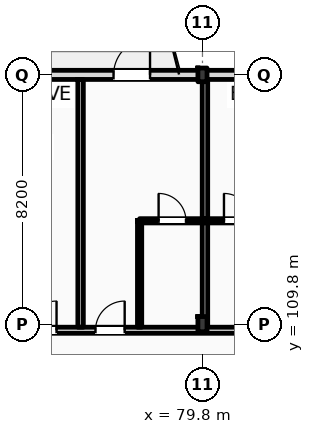
"""IFC4 building model, lengths in metres.
Left out: names, types, materials, properties, quantities, classifications, styles, units other than length and angle.
Written with IfcOpenShell. Run it as: python <this file> out.ifc"""

import sys

from ifc_helpers import new_model, si_unit, direction, frame, frame_2d, origin, origin_2d, place, context, subcontext, project, spatial, rectangle, i_section, extrude, element, fill, save


model = new_model("IFC4")
c1 = context("Model", 3, precision=1e-05, world=origin(), true_north=direction((0.0, 1.0)))
c2 = subcontext(c1, "Body", "Model", "MODEL_VIEW")
j1 = project(units=[si_unit("LENGTHUNIT", "METRE"), si_unit("PLANEANGLEUNIT", "RADIAN")], contexts=[c1])
p1 = place(None, origin())
s1 = spatial("IfcSite", under=j1, at=p1, CompositionType="ELEMENT")
p2 = place(p1, origin())
s2 = spatial("IfcBuilding", under=s1, at=p2, CompositionType="ELEMENT")
p3 = place(p2, frame((0.0, 0.0, 28.2)))
s3 = spatial("IfcBuildingStorey", under=s2, at=p3, CompositionType="ELEMENT", Elevation=28.2)
p4 = place(p3, frame((79.8, 109.8, 0.0), z_axis=(0.0, 0.0, 1.0), x_axis=(1.0, 0.0, 0.0)))
e1 = element("IfcColumn", 1, at=p4, inside=s3, PredefinedType="COLUMN", context=c2, shape_type="SweptSolid", body=[
    extrude(i_section(OverallWidth=0.3, OverallDepth=0.5, WebThickness=0.014, FlangeThickness=0.028, FilletRadius=0.027, at=origin_2d()), origin(), (0.0, 0.0, 1.0), 3.6),
])
p5 = place(p3, frame((79.8, 118.0, 0.0), z_axis=(0.0, 0.0, 1.0), x_axis=(1.0, 0.0, 0.0)))
e2 = element("IfcColumn", 2, at=p5, inside=s3, PredefinedType="COLUMN", context=c2, shape_type="SweptSolid", body=[
    extrude(i_section(OverallWidth=0.3, OverallDepth=0.45, WebThickness=0.014, FlangeThickness=0.026, FilletRadius=0.027, at=origin_2d()), origin(), (0.0, 0.0, 1.0), 3.6),
])
p6 = place(p3, frame((22.5, 118.0, 0.0), z_axis=(0.0, 0.0, 1.0), x_axis=(1.0, 0.0, 0.0)))
e3 = element("IfcWall", 3, at=p6, inside=s3, PredefinedType="STANDARD", context=c2, shape_type="SweptSolid", body=[
    extrude(rectangle(XDim=97.5, YDim=0.3, at=frame_2d((48.75, 0.0))), origin(), (0.0, 0.0, 1.0), 2.8),
])
p7 = place(p6, frame((0.91, 0.0, 0.9)))
e4 = element("IfcOpeningElement", 4, at=p7, cuts=e3, PredefinedType="OPENING", context=c2, shape_type="SweptSolid", body=[
    extrude(rectangle(XDim=0.9, YDim=1.72, at=frame_2d((0.45, 0.86))), frame((0.0, 0.16, 0.0), z_axis=(0.0, -1.0, 0.0), x_axis=(1.0, 0.0, 0.0)), (0.0, 0.0, 1.0), 0.32),
])
p8 = place(p6, frame((6.561, 0.0, 0.0)))
e5 = element("IfcOpeningElement", 5, at=p8, cuts=e3, PredefinedType="OPENING", context=c2, shape_type="SweptSolid", body=[
    extrude(rectangle(XDim=1.2, YDim=2.25, at=frame_2d((0.6, 1.125))), frame((0.0, 0.16, 0.0), z_axis=(0.0, -1.0, 0.0), x_axis=(1.0, 0.0, 0.0)), (0.0, 0.0, 1.0), 0.32),
])
p9 = place(p6, frame((11.477, 0.0, 0.9)))
e6 = element("IfcOpeningElement", 6, at=p9, cuts=e3, PredefinedType="OPENING", context=c2, shape_type="SweptSolid", body=[
    extrude(rectangle(XDim=1.1, YDim=1.5, at=frame_2d((0.55, 0.75))), frame((0.0, 0.16, 0.0), z_axis=(0.0, -1.0, 0.0), x_axis=(1.0, 0.0, 0.0)), (0.0, 0.0, 1.0), 0.32),
])
p10 = place(p6, frame((15.194, 0.0, 0.9)))
e7 = element("IfcOpeningElement", 7, at=p10, cuts=e3, PredefinedType="OPENING", context=c2, shape_type="SweptSolid", body=[
    extrude(rectangle(XDim=1.25, YDim=1.6, at=frame_2d((0.625, 0.8))), frame((0.0, 0.16, 0.0), z_axis=(0.0, -1.0, 0.0), x_axis=(1.0, 0.0, 0.0)), (0.0, 0.0, 1.0), 0.32),
])
p11 = place(p6, frame((19.509, 0.0, 0.9)))
e8 = element("IfcOpeningElement", 8, at=p11, cuts=e3, PredefinedType="OPENING", context=c2, shape_type="SweptSolid", body=[
    extrude(rectangle(XDim=1.4, YDim=1.7, at=frame_2d((0.7, 0.85))), frame((0.0, 0.16, 0.0), z_axis=(0.0, -1.0, 0.0), x_axis=(1.0, 0.0, 0.0)), (0.0, 0.0, 1.0), 0.32),
])
p12 = place(p6, frame((23.258, 0.0, 0.0)))
e9 = element("IfcOpeningElement", 9, at=p12, cuts=e3, PredefinedType="OPENING", context=c2, shape_type="SweptSolid", body=[
    extrude(rectangle(XDim=1.2, YDim=2.25, at=frame_2d((0.6, 1.125))), frame((0.0, 0.16, 0.0), z_axis=(0.0, -1.0, 0.0), x_axis=(1.0, 0.0, 0.0)), (0.0, 0.0, 1.0), 0.32),
])
p13 = place(p6, frame((28.115, 0.0, 0.9)))
e10 = element("IfcOpeningElement", 10, at=p13, cuts=e3, PredefinedType="OPENING", context=c2, shape_type="SweptSolid", body=[
    extrude(rectangle(XDim=1.75, YDim=1.72, at=frame_2d((0.875, 0.86))), frame((0.0, 0.16, 0.0), z_axis=(0.0, -1.0, 0.0), x_axis=(1.0, 0.0, 0.0)), (0.0, 0.0, 1.0), 0.32),
])
p14 = place(p6, frame((31.582, 0.0, 0.9)))
e11 = element("IfcOpeningElement", 11, at=p14, cuts=e3, PredefinedType="OPENING", context=c2, shape_type="SweptSolid", body=[
    extrude(rectangle(XDim=1.35, YDim=1.72, at=frame_2d((0.675, 0.86))), frame((0.0, 0.16, 0.0), z_axis=(0.0, -1.0, 0.0), x_axis=(1.0, 0.0, 0.0)), (0.0, 0.0, 1.0), 0.32),
])
p15 = place(p6, frame((37.379, 0.0, 0.0)))
e12 = element("IfcOpeningElement", 12, at=p15, cuts=e3, PredefinedType="OPENING", context=c2, shape_type="SweptSolid", body=[
    extrude(rectangle(XDim=1.2, YDim=2.25, at=frame_2d((0.6, 1.125))), frame((0.0, 0.16, 0.0), z_axis=(0.0, -1.0, 0.0), x_axis=(1.0, 0.0, 0.0)), (0.0, 0.0, 1.0), 0.32),
])
p16 = place(p6, frame((42.663, 0.0, 0.9)))
e13 = element("IfcOpeningElement", 13, at=p16, cuts=e3, PredefinedType="OPENING", context=c2, shape_type="SweptSolid", body=[
    extrude(rectangle(XDim=1.35, YDim=1.72, at=frame_2d((0.675, 0.86))), frame((0.0, 0.16, 0.0), z_axis=(0.0, -1.0, 0.0), x_axis=(1.0, 0.0, 0.0)), (0.0, 0.0, 1.0), 0.32),
])
p17 = place(p6, frame((45.119, 0.0, 0.9)))
e14 = element("IfcOpeningElement", 14, at=p17, cuts=e3, PredefinedType="OPENING", context=c2, shape_type="SweptSolid", body=[
    extrude(rectangle(XDim=2.871, YDim=1.72, at=frame_2d((1.436, 0.86))), frame((0.0, 0.16, 0.0), z_axis=(0.0, -1.0, 0.0), x_axis=(1.0, 0.0, 0.0)), (0.0, 0.0, 1.0), 0.32),
])
p18 = place(p6, frame((50.41, 0.0, 0.9)))
e15 = element("IfcOpeningElement", 15, at=p18, cuts=e3, PredefinedType="OPENING", context=c2, shape_type="SweptSolid", body=[
    extrude(rectangle(XDim=1.8, YDim=1.72, at=frame_2d((0.9, 0.86))), frame((0.0, 0.16, 0.0), z_axis=(0.0, -1.0, 0.0), x_axis=(1.0, 0.0, 0.0)), (0.0, 0.0, 1.0), 0.32),
])
p19 = place(p6, frame((54.375, 0.0, 0.0)))
e16 = element("IfcOpeningElement", 16, at=p19, cuts=e3, PredefinedType="OPENING", context=c2, shape_type="SweptSolid", body=[
    extrude(rectangle(XDim=1.2, YDim=2.25, at=frame_2d((0.6, 1.125))), frame((0.0, 0.16, 0.0), z_axis=(0.0, -1.0, 0.0), x_axis=(1.0, 0.0, 0.0)), (0.0, 0.0, 1.0), 0.32),
])
p20 = place(p6, frame((59.052, 0.0, 0.9)))
e17 = element("IfcOpeningElement", 17, at=p20, cuts=e3, PredefinedType="OPENING", context=c2, shape_type="SweptSolid", body=[
    extrude(rectangle(XDim=1.35, YDim=1.72, at=frame_2d((0.675, 0.86))), frame((0.0, 0.16, 0.0), z_axis=(0.0, -1.0, 0.0), x_axis=(1.0, 0.0, 0.0)), (0.0, 0.0, 1.0), 0.32),
])
p21 = place(p6, frame((62.768, 0.0, 0.9)))
e18 = element("IfcOpeningElement", 18, at=p21, cuts=e3, PredefinedType="OPENING", context=c2, shape_type="SweptSolid", body=[
    extrude(rectangle(XDim=1.5, YDim=1.72, at=frame_2d((0.75, 0.86))), frame((0.0, 0.16, 0.0), z_axis=(0.0, -1.0, 0.0), x_axis=(1.0, 0.0, 0.0)), (0.0, 0.0, 1.0), 0.32),
])
p22 = place(p6, frame((68.498, 0.0, 0.0)))
e19 = element("IfcOpeningElement", 19, at=p22, cuts=e3, PredefinedType="OPENING", context=c2, shape_type="SweptSolid", body=[
    extrude(rectangle(XDim=1.2, YDim=2.25, at=frame_2d((0.6, 1.125))), frame((0.0, 0.16, 0.0), z_axis=(0.0, -1.0, 0.0), x_axis=(1.0, 0.0, 0.0)), (0.0, 0.0, 1.0), 0.32),
])
p23 = place(p6, frame((71.265, 0.0, 0.9)))
e20 = element("IfcOpeningElement", 20, at=p23, cuts=e3, PredefinedType="OPENING", context=c2, shape_type="SweptSolid", body=[
    extrude(rectangle(XDim=0.9, YDim=1.72, at=frame_2d((0.45, 0.86))), frame((0.0, 0.16, 0.0), z_axis=(0.0, -1.0, 0.0), x_axis=(1.0, 0.0, 0.0)), (0.0, 0.0, 1.0), 0.32),
])
p24 = place(p6, frame((76.316, 0.0, 0.9)))
e21 = element("IfcOpeningElement", 21, at=p24, cuts=e3, PredefinedType="OPENING", context=c2, shape_type="SweptSolid", body=[
    extrude(rectangle(XDim=1.95, YDim=1.72, at=frame_2d((0.975, 0.86))), frame((0.0, 0.16, 0.0), z_axis=(0.0, -1.0, 0.0), x_axis=(1.0, 0.0, 0.0)), (0.0, 0.0, 1.0), 0.32),
])
p25 = place(p6, frame((81.632, 0.0, 0.9)))
e22 = element("IfcOpeningElement", 22, at=p25, cuts=e3, PredefinedType="OPENING", context=c2, shape_type="SweptSolid", body=[
    extrude(rectangle(XDim=1.35, YDim=1.72, at=frame_2d((0.675, 0.86))), frame((0.0, 0.16, 0.0), z_axis=(0.0, -1.0, 0.0), x_axis=(1.0, 0.0, 0.0)), (0.0, 0.0, 1.0), 0.32),
])
p26 = place(p6, frame((84.948, 0.0, 0.9)))
e23 = element("IfcOpeningElement", 23, at=p26, cuts=e3, PredefinedType="OPENING", context=c2, shape_type="SweptSolid", body=[
    extrude(rectangle(XDim=2.25, YDim=1.72, at=frame_2d((1.125, 0.86))), frame((0.0, 0.16, 0.0), z_axis=(0.0, -1.0, 0.0), x_axis=(1.0, 0.0, 0.0)), (0.0, 0.0, 1.0), 0.32),
])
p27 = place(p6, frame((90.063, 0.0, 0.9)))
e24 = element("IfcOpeningElement", 24, at=p27, cuts=e3, PredefinedType="OPENING", context=c2, shape_type="SweptSolid", body=[
    extrude(rectangle(XDim=1.8, YDim=1.72, at=frame_2d((0.9, 0.86))), frame((0.0, 0.16, 0.0), z_axis=(0.0, -1.0, 0.0), x_axis=(1.0, 0.0, 0.0)), (0.0, 0.0, 1.0), 0.32),
])
p28 = place(p6, frame((93.529, 0.0, 0.9)))
e25 = element("IfcOpeningElement", 25, at=p28, cuts=e3, PredefinedType="OPENING", context=c2, shape_type="SweptSolid", body=[
    extrude(rectangle(XDim=2.55, YDim=1.72, at=frame_2d((1.275, 0.86))), frame((0.0, 0.16, 0.0), z_axis=(0.0, -1.0, 0.0), x_axis=(1.0, 0.0, 0.0)), (0.0, 0.0, 1.0), 0.32),
])
p29 = place(p3, frame((10.65, 109.6, 0.0), z_axis=(0.0, 0.0, 1.0), x_axis=(1.0, 0.0, 0.0)))
e26 = element("IfcWall", 26, at=p29, inside=s3, PredefinedType="PARTITIONING", context=c2, shape_type="SweptSolid", body=[
    extrude(rectangle(XDim=109.21, YDim=0.2, at=frame_2d((54.605, 0.0))), origin(), (0.0, 0.0, 1.0), 2.8),
])
p30 = place(p29, frame((12.611, 0.0, 0.0)))
e27 = element("IfcOpeningElement", 27, at=p30, cuts=e26, PredefinedType="OPENING", context=c2, shape_type="SweptSolid", body=[
    extrude(rectangle(XDim=1.02, YDim=2.2, at=frame_2d((0.51, 1.1))), frame((0.0, 0.11, 0.0), z_axis=(0.0, -1.0, 0.0), x_axis=(1.0, 0.0, 0.0)), (0.0, 0.0, 1.0), 0.22),
])
p31 = place(p29, frame((19.451, 0.0, 0.0)))
e28 = element("IfcOpeningElement", 28, at=p31, cuts=e26, PredefinedType="OPENING", context=c2, shape_type="SweptSolid", body=[
    extrude(rectangle(XDim=1.02, YDim=2.2, at=frame_2d((0.51, 1.1))), frame((0.0, 0.11, 0.0), z_axis=(0.0, -1.0, 0.0), x_axis=(1.0, 0.0, 0.0)), (0.0, 0.0, 1.0), 0.22),
])
p32 = place(p29, frame((23.842, 0.0, 0.0)))
e29 = element("IfcOpeningElement", 29, at=p32, cuts=e26, PredefinedType="OPENING", context=c2, shape_type="SweptSolid", body=[
    extrude(rectangle(XDim=1.02, YDim=2.2, at=frame_2d((0.51, 1.1))), frame((0.0, 0.11, 0.0), z_axis=(0.0, -1.0, 0.0), x_axis=(1.0, 0.0, 0.0)), (0.0, 0.0, 1.0), 0.22),
])
p33 = place(p29, frame((26.084, 0.0, 0.0)))
e30 = element("IfcOpeningElement", 30, at=p33, cuts=e26, PredefinedType="OPENING", context=c2, shape_type="SweptSolid", body=[
    extrude(rectangle(XDim=1.02, YDim=2.2, at=frame_2d((0.51, 1.1))), frame((0.0, 0.11, 0.0), z_axis=(0.0, -1.0, 0.0), x_axis=(1.0, 0.0, 0.0)), (0.0, 0.0, 1.0), 0.22),
])
p34 = place(p29, frame((32.655, 0.0, 0.0)))
e31 = element("IfcOpeningElement", 31, at=p34, cuts=e26, PredefinedType="OPENING", context=c2, shape_type="SweptSolid", body=[
    extrude(rectangle(XDim=0.96, YDim=2.2, at=frame_2d((0.48, 1.1))), frame((0.0, 0.11, 0.0), z_axis=(0.0, -1.0, 0.0), x_axis=(1.0, 0.0, 0.0)), (0.0, 0.0, 1.0), 0.22),
])
p35 = place(p29, frame((34.895, 0.0, 0.0)))
e32 = element("IfcOpeningElement", 32, at=p35, cuts=e26, PredefinedType="OPENING", context=c2, shape_type="SweptSolid", body=[
    extrude(rectangle(XDim=0.96, YDim=2.2, at=frame_2d((0.48, 1.1))), frame((0.0, 0.11, 0.0), z_axis=(0.0, -1.0, 0.0), x_axis=(1.0, 0.0, 0.0)), (0.0, 0.0, 1.0), 0.22),
])
p36 = place(p29, frame((41.436, 0.0, 0.0)))
e33 = element("IfcOpeningElement", 33, at=p36, cuts=e26, PredefinedType="OPENING", context=c2, shape_type="SweptSolid", body=[
    extrude(rectangle(XDim=0.96, YDim=2.2, at=frame_2d((0.48, 1.1))), frame((0.0, 0.11, 0.0), z_axis=(0.0, -1.0, 0.0), x_axis=(1.0, 0.0, 0.0)), (0.0, 0.0, 1.0), 0.22),
])
p37 = place(p29, frame((43.427, 0.0, 0.0)))
e34 = element("IfcOpeningElement", 34, at=p37, cuts=e26, PredefinedType="OPENING", context=c2, shape_type="SweptSolid", body=[
    extrude(rectangle(XDim=0.96, YDim=2.2, at=frame_2d((0.48, 1.1))), frame((0.0, 0.11, 0.0), z_axis=(0.0, -1.0, 0.0), x_axis=(1.0, 0.0, 0.0)), (0.0, 0.0, 1.0), 0.22),
])
p38 = place(p29, frame((50.218, 0.0, 0.0)))
e35 = element("IfcOpeningElement", 35, at=p38, cuts=e26, PredefinedType="OPENING", context=c2, shape_type="SweptSolid", body=[
    extrude(rectangle(XDim=0.96, YDim=2.2, at=frame_2d((0.48, 1.1))), frame((0.0, 0.11, 0.0), z_axis=(0.0, -1.0, 0.0), x_axis=(1.0, 0.0, 0.0)), (0.0, 0.0, 1.0), 0.22),
])
p39 = place(p29, frame((54.859, 0.0, 0.0)))
e36 = element("IfcOpeningElement", 36, at=p39, cuts=e26, PredefinedType="OPENING", context=c2, shape_type="SweptSolid", body=[
    extrude(rectangle(XDim=0.96, YDim=2.2, at=frame_2d((0.48, 1.1))), frame((0.0, 0.11, 0.0), z_axis=(0.0, -1.0, 0.0), x_axis=(1.0, 0.0, 0.0)), (0.0, 0.0, 1.0), 0.22),
])
p40 = place(p29, frame((59.0, 0.0, 0.0)))
e37 = element("IfcOpeningElement", 37, at=p40, cuts=e26, PredefinedType="OPENING", context=c2, shape_type="SweptSolid", body=[
    extrude(rectangle(XDim=0.96, YDim=2.2, at=frame_2d((0.48, 1.1))), frame((0.0, 0.11, 0.0), z_axis=(0.0, -1.0, 0.0), x_axis=(1.0, 0.0, 0.0)), (0.0, 0.0, 1.0), 0.22),
])
p41 = place(p29, frame((63.39, 0.0, 0.0)))
e38 = element("IfcOpeningElement", 38, at=p41, cuts=e26, PredefinedType="OPENING", context=c2, shape_type="SweptSolid", body=[
    extrude(rectangle(XDim=0.96, YDim=2.2, at=frame_2d((0.48, 1.1))), frame((0.0, 0.11, 0.0), z_axis=(0.0, -1.0, 0.0), x_axis=(1.0, 0.0, 0.0)), (0.0, 0.0, 1.0), 0.22),
])
p42 = place(p29, frame((65.631, 0.0, 0.0)))
e39 = element("IfcOpeningElement", 39, at=p42, cuts=e26, PredefinedType="OPENING", context=c2, shape_type="SweptSolid", body=[
    extrude(rectangle(XDim=0.96, YDim=2.2, at=frame_2d((0.48, 1.1))), frame((0.0, 0.11, 0.0), z_axis=(0.0, -1.0, 0.0), x_axis=(1.0, 0.0, 0.0)), (0.0, 0.0, 1.0), 0.22),
])
p43 = place(p29, frame((72.172, 0.0, 0.0)))
e40 = element("IfcOpeningElement", 40, at=p43, cuts=e26, PredefinedType="OPENING", context=c2, shape_type="SweptSolid", body=[
    extrude(rectangle(XDim=0.96, YDim=2.2, at=frame_2d((0.48, 1.1))), frame((0.0, 0.11, 0.0), z_axis=(0.0, -1.0, 0.0), x_axis=(1.0, 0.0, 0.0)), (0.0, 0.0, 1.0), 0.22),
])
p44 = place(p29, frame((74.413, 0.0, 0.0)))
e41 = element("IfcOpeningElement", 41, at=p44, cuts=e26, PredefinedType="OPENING", context=c2, shape_type="SweptSolid", body=[
    extrude(rectangle(XDim=0.96, YDim=2.2, at=frame_2d((0.48, 1.1))), frame((0.0, 0.11, 0.0), z_axis=(0.0, -1.0, 0.0), x_axis=(1.0, 0.0, 0.0)), (0.0, 0.0, 1.0), 0.22),
])
p45 = place(p29, frame((80.954, 0.0, 0.0)))
e42 = element("IfcOpeningElement", 42, at=p45, cuts=e26, PredefinedType="OPENING", context=c2, shape_type="SweptSolid", body=[
    extrude(rectangle(XDim=0.96, YDim=2.2, at=frame_2d((0.48, 1.1))), frame((0.0, 0.11, 0.0), z_axis=(0.0, -1.0, 0.0), x_axis=(1.0, 0.0, 0.0)), (0.0, 0.0, 1.0), 0.22),
])
p46 = place(p29, frame((83.195, 0.0, 0.0)))
e43 = element("IfcOpeningElement", 43, at=p46, cuts=e26, PredefinedType="OPENING", context=c2, shape_type="SweptSolid", body=[
    extrude(rectangle(XDim=0.96, YDim=2.2, at=frame_2d((0.48, 1.1))), frame((0.0, 0.11, 0.0), z_axis=(0.0, -1.0, 0.0), x_axis=(1.0, 0.0, 0.0)), (0.0, 0.0, 1.0), 0.22),
])
p47 = place(p29, frame((89.735, 0.0, 0.0)))
e44 = element("IfcOpeningElement", 44, at=p47, cuts=e26, PredefinedType="OPENING", context=c2, shape_type="SweptSolid", body=[
    extrude(rectangle(XDim=0.96, YDim=2.2, at=frame_2d((0.48, 1.1))), frame((0.0, 0.11, 0.0), z_axis=(0.0, -1.0, 0.0), x_axis=(1.0, 0.0, 0.0)), (0.0, 0.0, 1.0), 0.22),
])
p48 = place(p29, frame((94.126, 0.0, 0.0)))
e45 = element("IfcOpeningElement", 45, at=p48, cuts=e26, PredefinedType="OPENING", context=c2, shape_type="SweptSolid", body=[
    extrude(rectangle(XDim=0.96, YDim=2.2, at=frame_2d((0.48, 1.1))), frame((0.0, 0.11, 0.0), z_axis=(0.0, -1.0, 0.0), x_axis=(1.0, 0.0, 0.0)), (0.0, 0.0, 1.0), 0.22),
])
p49 = place(p29, frame((98.517, 0.0, 0.0)))
e46 = element("IfcOpeningElement", 46, at=p49, cuts=e26, PredefinedType="OPENING", context=c2, shape_type="SweptSolid", body=[
    extrude(rectangle(XDim=0.96, YDim=2.2, at=frame_2d((0.48, 1.1))), frame((0.0, 0.11, 0.0), z_axis=(0.0, -1.0, 0.0), x_axis=(1.0, 0.0, 0.0)), (0.0, 0.0, 1.0), 0.22),
])
p50 = place(p29, frame((102.908, 0.0, 0.0)))
e47 = element("IfcOpeningElement", 47, at=p50, cuts=e26, PredefinedType="OPENING", context=c2, shape_type="SweptSolid", body=[
    extrude(rectangle(XDim=0.96, YDim=2.2, at=frame_2d((0.48, 1.1))), frame((0.0, 0.11, 0.0), z_axis=(0.0, -1.0, 0.0), x_axis=(1.0, 0.0, 0.0)), (0.0, 0.0, 1.0), 0.22),
])
p51 = place(p29, frame((105.099, 0.0, 0.0)))
e48 = element("IfcOpeningElement", 48, at=p51, cuts=e26, PredefinedType="OPENING", context=c2, shape_type="SweptSolid", body=[
    extrude(rectangle(XDim=0.96, YDim=2.2, at=frame_2d((0.48, 1.1))), frame((0.0, 0.11, 0.0), z_axis=(0.0, -1.0, 0.0), x_axis=(1.0, 0.0, 0.0)), (0.0, 0.0, 1.0), 0.22),
])
p52 = place(p29, frame((2.716, 0.0, 0.0)))
e49 = element("IfcOpeningElement", 49, at=p52, cuts=e26, PredefinedType="OPENING", context=c2, shape_type="SweptSolid", body=[
    extrude(rectangle(XDim=1.35, YDim=2.25, at=frame_2d((0.675, 1.125))), frame((0.0, 0.11, 0.0), z_axis=(0.0, -1.0, 0.0), x_axis=(1.0, 0.0, 0.0)), (0.0, 0.0, 1.0), 0.22),
])
p53 = place(p29, frame((6.65, 0.0, 0.0)))
e50 = element("IfcOpeningElement", 50, at=p53, cuts=e26, PredefinedType="OPENING", context=c2, shape_type="SweptSolid", body=[
    extrude(rectangle(XDim=1.35, YDim=2.25, at=frame_2d((0.675, 1.125))), frame((0.0, 0.11, 0.0), z_axis=(0.0, -1.0, 0.0), x_axis=(1.0, 0.0, 0.0)), (0.0, 0.0, 1.0), 0.22),
])
p54 = place(p29, frame((10.583, 0.0, 0.0)))
e51 = element("IfcOpeningElement", 51, at=p54, cuts=e26, PredefinedType="OPENING", context=c2, shape_type="SweptSolid", body=[
    extrude(rectangle(XDim=1.35, YDim=2.25, at=frame_2d((0.675, 1.125))), frame((0.0, 0.11, 0.0), z_axis=(0.0, -1.0, 0.0), x_axis=(1.0, 0.0, 0.0)), (0.0, 0.0, 1.0), 0.22),
])
p55 = place(p3, frame((75.791, 109.7, 0.0), z_axis=(0.0, 0.0, 1.0), x_axis=(0.0, 1.0, 0.0)))
e52 = element("IfcWall", 52, at=p55, inside=s3, PredefinedType="PARTITIONING", context=c2, shape_type="SweptSolid", body=[
    extrude(rectangle(XDim=8.15, YDim=0.18, at=frame_2d((4.075, 0.0))), origin(), (0.0, 0.0, 1.0), 3.36),
])
p56 = place(p3, frame((79.882, 109.7, 0.0), z_axis=(0.0, 0.0, 1.0), x_axis=(0.0, 1.0, 0.0)))
e53 = element("IfcWall", 53, at=p56, inside=s3, PredefinedType="PARTITIONING", context=c2, shape_type="SweptSolid", body=[
    extrude(rectangle(XDim=8.15, YDim=0.18, at=frame_2d((4.075, 0.0))), origin(), (0.0, 0.0, 1.0), 2.99),
])
p57 = place(p3, frame((77.732, 109.7, 0.0), z_axis=(0.0, 0.0, 1.0), x_axis=(0.0, 1.0, 0.0)))
e54 = element("IfcWall", 54, at=p57, inside=s3, PredefinedType="PARTITIONING", context=c2, shape_type="SweptSolid", body=[
    extrude(rectangle(XDim=3.5, YDim=0.14, at=frame_2d((1.75, 0.0))), origin(), (0.0, 0.0, 1.0), 3.36),
])
p58 = place(p3, frame((77.732, 113.2, 0.0), z_axis=(0.0, 0.0, 1.0), x_axis=(1.0, 0.0, 0.0)))
e55 = element("IfcWall", 55, at=p58, inside=s3, PredefinedType="PARTITIONING", context=c2, shape_type="SweptSolid", body=[
    extrude(rectangle(XDim=2.15, YDim=0.14, at=frame_2d((1.075, 0.0))), origin(), (0.0, 0.0, 1.0), 3.36),
])
p59 = place(p58, frame((0.625, 0.0, 0.0)))
e56 = element("IfcOpeningElement", 56, at=p59, cuts=e55, PredefinedType="OPENING", context=c2, shape_type="SweptSolid", body=[
    extrude(rectangle(XDim=0.9, YDim=2.1, at=frame_2d((0.45, 1.05))), frame((0.0, 0.08, 0.0), z_axis=(0.0, -1.0, 0.0), x_axis=(1.0, 0.0, 0.0)), (0.0, 0.0, 1.0), 0.16),
])
p60 = place(p3, frame((79.882, 113.2, 0.0), z_axis=(0.0, 0.0, 1.0), x_axis=(1.0, 0.0, 0.0)))
e57 = element("IfcWall", 57, at=p60, inside=s3, PredefinedType="PARTITIONING", context=c2, shape_type="SweptSolid", body=[
    extrude(rectangle(XDim=2.15, YDim=0.14, at=frame_2d((1.075, 0.0))), origin(), (0.0, 0.0, 1.0), 3.36),
])
p61 = place(p60, frame((0.625, 0.0, 0.0)))
e58 = element("IfcOpeningElement", 58, at=p61, cuts=e57, PredefinedType="OPENING", context=c2, shape_type="SweptSolid", body=[
    extrude(rectangle(XDim=0.9, YDim=2.1, at=frame_2d((0.45, 1.05))), frame((0.0, 0.08, 0.0), z_axis=(0.0, -1.0, 0.0), x_axis=(1.0, 0.0, 0.0)), (0.0, 0.0, 1.0), 0.16),
])
p62 = place(p19, origin())
e59 = element("IfcDoor", 59, at=p62, inside=s3, OperationType="SINGLE_SWING_RIGHT", PredefinedType="DOOR", context=c2, shape_type="SweptSolid", body=[
    extrude(rectangle(XDim=1.2, YDim=2.25, at=frame_2d((0.6, 1.125))), frame((0.0, 0.025, 0.0), z_axis=(0.0, -1.0, 0.0), x_axis=(1.0, 0.0, 0.0)), (0.0, 0.0, 1.0), 0.05),
])
fill(e16, e59)
p63 = place(p41, origin())
e60 = element("IfcDoor", 60, at=p63, inside=s3, OperationType="SINGLE_SWING_RIGHT", PredefinedType="DOOR", context=c2, shape_type="SweptSolid", body=[
    extrude(rectangle(XDim=0.96, YDim=2.2, at=frame_2d((0.48, 1.1))), frame((0.0, 0.025, 0.0), z_axis=(0.0, -1.0, 0.0), x_axis=(1.0, 0.0, 0.0)), (0.0, 0.0, 1.0), 0.05),
])
fill(e38, e60)
p64 = place(p42, origin())
e61 = element("IfcDoor", 61, at=p64, inside=s3, OperationType="SINGLE_SWING_RIGHT", PredefinedType="DOOR", context=c2, shape_type="SweptSolid", body=[
    extrude(rectangle(XDim=0.96, YDim=2.2, at=frame_2d((0.48, 1.1))), frame((0.0, 0.025, 0.0), z_axis=(0.0, -1.0, 0.0), x_axis=(1.0, 0.0, 0.0)), (0.0, 0.0, 1.0), 0.05),
])
fill(e39, e61)
p65 = place(p59, origin())
e62 = element("IfcDoor", 62, at=p65, inside=s3, OperationType="SINGLE_SWING_LEFT", PredefinedType="DOOR", context=c2, shape_type="SweptSolid", body=[
    extrude(rectangle(XDim=0.9, YDim=2.1, at=frame_2d((0.45, 1.05))), frame((0.0, 0.025, 0.0), z_axis=(0.0, -1.0, 0.0), x_axis=(1.0, 0.0, 0.0)), (0.0, 0.0, 1.0), 0.05),
])
fill(e56, e62)
p66 = place(p61, origin())
e63 = element("IfcDoor", 63, at=p66, inside=s3, OperationType="SINGLE_SWING_LEFT", PredefinedType="DOOR", context=c2, shape_type="SweptSolid", body=[
    extrude(rectangle(XDim=0.9, YDim=2.1, at=frame_2d((0.45, 1.05))), frame((0.0, 0.025, 0.0), z_axis=(0.0, -1.0, 0.0), x_axis=(1.0, 0.0, 0.0)), (0.0, 0.0, 1.0), 0.05),
])
fill(e58, e63)
save(model, sys.argv[1])
